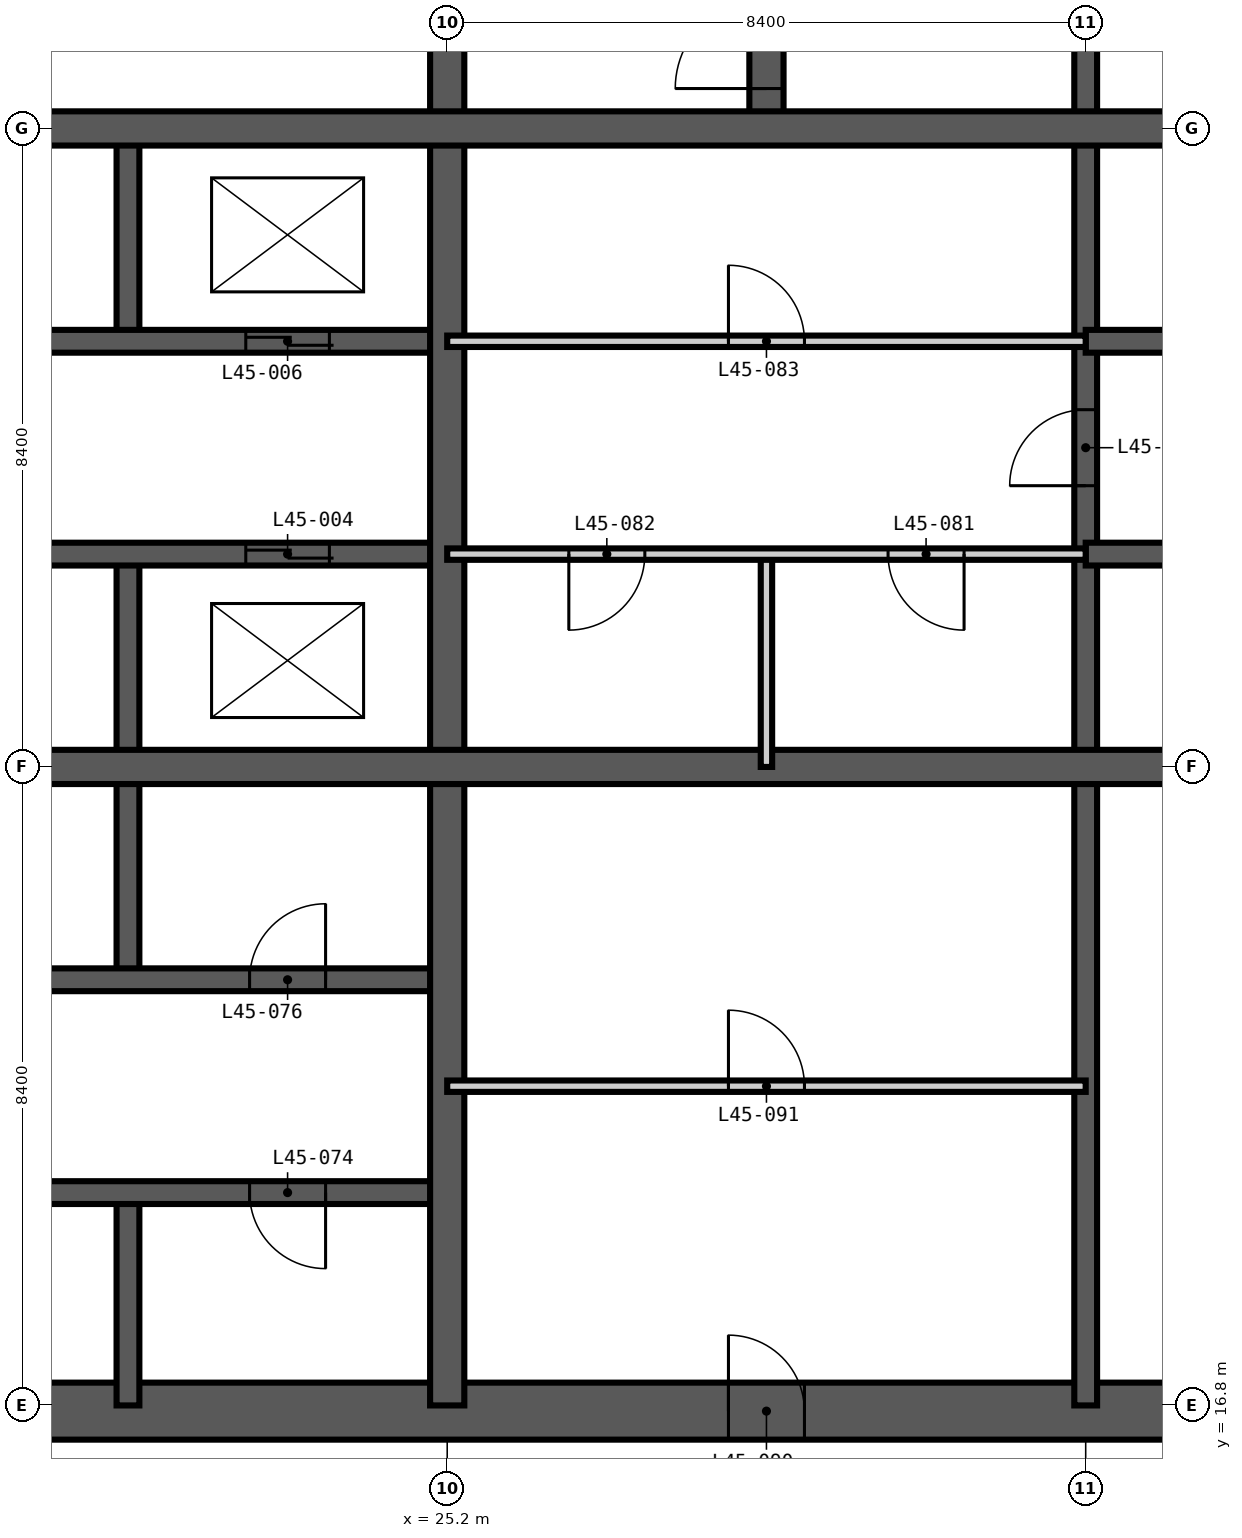
"""IFC4 building model, lengths in metres.
Left out: names, types, materials, properties, quantities, classifications, styles, units other than length and angle.
Written with IfcOpenShell. Run it as: python <this file> out.ifc"""

import sys

from ifc_helpers import new_model, si_unit, direction, frame, frame_2d, origin, place, context, subcontext, project, spatial, rectangle, extrude, element, fill, save


model = new_model("IFC4")
c1 = context("Model", 3, precision=1e-05, world=origin(), true_north=direction((0.0, 1.0)))
c2 = subcontext(c1, "Body", "Model", "MODEL_VIEW")
j1 = project(units=[si_unit("LENGTHUNIT", "METRE"), si_unit("PLANEANGLEUNIT", "RADIAN")], contexts=[c1])
p1 = place(None, origin())
s1 = spatial("IfcSite", under=j1, at=p1, CompositionType="ELEMENT")
p2 = place(p1, origin())
s2 = spatial("IfcBuilding", under=s1, at=p2, CompositionType="ELEMENT")
p3 = place(p2, frame((0.0, 0.0, 177.0)))
s3 = spatial("IfcBuildingStorey", under=s2, at=p3, CompositionType="ELEMENT", Elevation=177.0)
p4 = place(p3, frame((16.35, 16.725, -0.35), z_axis=(0.0, 0.0, 1.0), x_axis=(1.0, 0.0, 0.0)))
e1 = element("IfcWall", 1, at=p4, inside=s3, PredefinedType="SHEAR", context=c2, shape_type="SweptSolid", body=[
    extrude(rectangle(XDim=26.1, YDim=0.75, at=frame_2d((13.05, 0.0))), origin(), (0.0, 0.0, 1.0), 3.6),
])
p5 = place(p4, frame((12.55, 0.0, 0.35)))
e2 = element("IfcOpeningElement", 2, at=p5, cuts=e1, PredefinedType="OPENING", context=c2, shape_type="SweptSolid", body=[
    extrude(rectangle(XDim=1.0, YDim=2.1, at=frame_2d((0.5, 1.05))), frame((0.0, 0.385, 0.0), z_axis=(0.0, -1.0, 0.0), x_axis=(1.0, 0.0, 0.0)), (0.0, 0.0, 1.0), 0.77),
])
p6 = place(p4, frame((18.85, 0.0, 0.35)))
e3 = element("IfcOpeningElement", 3, at=p6, cuts=e1, PredefinedType="OPENING", context=c2, shape_type="SweptSolid", body=[
    extrude(rectangle(XDim=1.0, YDim=2.1, at=frame_2d((0.5, 1.05))), frame((0.0, 0.385, 0.0), z_axis=(0.0, -1.0, 0.0), x_axis=(1.0, 0.0, 0.0)), (0.0, 0.0, 1.0), 0.77),
])
p7 = place(p3, frame((21.0, 16.8, -0.35), z_axis=(0.0, 0.0, 1.0), x_axis=(0.0, 1.0, 0.0)))
e4 = element("IfcWall", 4, at=p7, inside=s3, PredefinedType="SHEAR", context=c2, shape_type="SweptSolid", body=[
    extrude(rectangle(XDim=2.8, YDim=0.3, at=frame_2d((1.4, 0.0))), origin(), (0.0, 0.0, 1.0), 3.6),
])
p8 = place(p3, frame((21.0, 22.4, -0.35), z_axis=(0.0, 0.0, 1.0), x_axis=(0.0, 1.0, 0.0)))
e5 = element("IfcWall", 5, at=p8, inside=s3, PredefinedType="SHEAR", context=c2, shape_type="SweptSolid", body=[
    extrude(rectangle(XDim=5.6, YDim=0.3, at=frame_2d((2.8, 0.0))), origin(), (0.0, 0.0, 1.0), 3.6),
])
p9 = place(p3, frame((21.0, 30.8, -0.35), z_axis=(0.0, 0.0, 1.0), x_axis=(0.0, 1.0, 0.0)))
e6 = element("IfcWall", 6, at=p9, inside=s3, PredefinedType="SHEAR", context=c2, shape_type="SweptSolid", body=[
    extrude(rectangle(XDim=2.8, YDim=0.3, at=frame_2d((1.4, 0.0))), origin(), (0.0, 0.0, 1.0), 3.6),
])
p10 = place(p3, frame((33.6, 16.8, -0.35), z_axis=(0.0, 0.0, 1.0), x_axis=(0.0, 1.0, 0.0)))
e7 = element("IfcWall", 7, at=p10, inside=s3, PredefinedType="SHEAR", context=c2, shape_type="SweptSolid", body=[
    extrude(rectangle(XDim=25.2, YDim=0.3, at=frame_2d((12.6, 0.0))), origin(), (0.0, 0.0, 1.0), 3.6),
])
p11 = place(p10, frame((22.5, 0.0, 0.35)))
e8 = element("IfcOpeningElement", 8, at=p11, cuts=e7, PredefinedType="OPENING", context=c2, shape_type="SweptSolid", body=[
    extrude(rectangle(XDim=1.2, YDim=2.2, at=frame_2d((0.6, 1.1))), frame((0.0, 0.16, 0.0), z_axis=(0.0, -1.0, 0.0), x_axis=(1.0, 0.0, 0.0)), (0.0, 0.0, 1.0), 0.32),
])
p12 = place(p10, frame((18.3, 0.0, 0.35)))
e9 = element("IfcOpeningElement", 9, at=p12, cuts=e7, PredefinedType="OPENING", context=c2, shape_type="SweptSolid", body=[
    extrude(rectangle(XDim=1.2, YDim=2.2, at=frame_2d((0.6, 1.1))), frame((0.0, 0.16, 0.0), z_axis=(0.0, -1.0, 0.0), x_axis=(1.0, 0.0, 0.0)), (0.0, 0.0, 1.0), 0.32),
])
p13 = place(p10, frame((12.1, 0.0, 0.35)))
e10 = element("IfcOpeningElement", 10, at=p13, cuts=e7, PredefinedType="OPENING", context=c2, shape_type="SweptSolid", body=[
    extrude(rectangle(XDim=1.0, YDim=2.1, at=frame_2d((0.5, 1.05))), frame((0.0, 0.16, 0.0), z_axis=(0.0, -1.0, 0.0), x_axis=(1.0, 0.0, 0.0)), (0.0, 0.0, 1.0), 0.32),
])
p14 = place(p3, frame((16.8, 19.6, -0.35), z_axis=(0.0, 0.0, 1.0), x_axis=(1.0, 0.0, 0.0)))
e11 = element("IfcWall", 11, at=p14, inside=s3, PredefinedType="SHEAR", context=c2, shape_type="SweptSolid", body=[
    extrude(rectangle(XDim=8.4, YDim=0.3, at=frame_2d((4.2, 0.0))), origin(), (0.0, 0.0, 1.0), 3.6),
])
p15 = place(p14, frame((1.6, 0.0, 0.35)))
e12 = element("IfcOpeningElement", 12, at=p15, cuts=e11, PredefinedType="OPENING", context=c2, shape_type="SweptSolid", body=[
    extrude(rectangle(XDim=1.0, YDim=2.1, at=frame_2d((0.5, 1.05))), frame((0.0, 0.16, 0.0), z_axis=(0.0, -1.0, 0.0), x_axis=(1.0, 0.0, 0.0)), (0.0, 0.0, 1.0), 0.32),
])
p16 = place(p14, frame((5.8, 0.0, 0.35)))
e13 = element("IfcOpeningElement", 13, at=p16, cuts=e11, PredefinedType="OPENING", context=c2, shape_type="SweptSolid", body=[
    extrude(rectangle(XDim=1.0, YDim=2.1, at=frame_2d((0.5, 1.05))), frame((0.0, 0.16, 0.0), z_axis=(0.0, -1.0, 0.0), x_axis=(1.0, 0.0, 0.0)), (0.0, 0.0, 1.0), 0.32),
])
p17 = place(p3, frame((16.8, 22.4, -0.35), z_axis=(0.0, 0.0, 1.0), x_axis=(1.0, 0.0, 0.0)))
e14 = element("IfcWall", 14, at=p17, inside=s3, PredefinedType="SHEAR", context=c2, shape_type="SweptSolid", body=[
    extrude(rectangle(XDim=8.4, YDim=0.3, at=frame_2d((4.2, 0.0))), origin(), (0.0, 0.0, 1.0), 3.6),
])
p18 = place(p17, frame((1.6, 0.0, 0.35)))
e15 = element("IfcOpeningElement", 15, at=p18, cuts=e14, PredefinedType="OPENING", context=c2, shape_type="SweptSolid", body=[
    extrude(rectangle(XDim=1.0, YDim=2.1, at=frame_2d((0.5, 1.05))), frame((0.0, 0.16, 0.0), z_axis=(0.0, -1.0, 0.0), x_axis=(1.0, 0.0, 0.0)), (0.0, 0.0, 1.0), 0.32),
])
p19 = place(p17, frame((5.8, 0.0, 0.35)))
e16 = element("IfcOpeningElement", 16, at=p19, cuts=e14, PredefinedType="OPENING", context=c2, shape_type="SweptSolid", body=[
    extrude(rectangle(XDim=1.0, YDim=2.1, at=frame_2d((0.5, 1.05))), frame((0.0, 0.16, 0.0), z_axis=(0.0, -1.0, 0.0), x_axis=(1.0, 0.0, 0.0)), (0.0, 0.0, 1.0), 0.32),
])
p20 = place(p3, frame((16.8, 28.0, -0.35), z_axis=(0.0, 0.0, 1.0), x_axis=(1.0, 0.0, 0.0)))
e17 = element("IfcWall", 17, at=p20, inside=s3, PredefinedType="SHEAR", context=c2, shape_type="SweptSolid", body=[
    extrude(rectangle(XDim=8.4, YDim=0.3, at=frame_2d((4.2, 0.0))), origin(), (0.0, 0.0, 1.0), 3.6),
])
p21 = place(p20, frame((1.55, 0.0, 0.35)))
e18 = element("IfcOpeningElement", 18, at=p21, cuts=e17, PredefinedType="OPENING", context=c2, shape_type="SweptSolid", body=[
    extrude(rectangle(XDim=1.1, YDim=2.2, at=frame_2d((0.55, 1.1))), frame((0.0, 0.16, 0.0), z_axis=(0.0, -1.0, 0.0), x_axis=(1.0, 0.0, 0.0)), (0.0, 0.0, 1.0), 0.32),
])
p22 = place(p20, frame((5.75, 0.0, 0.35)))
e19 = element("IfcOpeningElement", 19, at=p22, cuts=e17, PredefinedType="OPENING", context=c2, shape_type="SweptSolid", body=[
    extrude(rectangle(XDim=1.1, YDim=2.2, at=frame_2d((0.55, 1.1))), frame((0.0, 0.16, 0.0), z_axis=(0.0, -1.0, 0.0), x_axis=(1.0, 0.0, 0.0)), (0.0, 0.0, 1.0), 0.32),
])
p23 = place(p3, frame((33.6, 28.0, -0.35), z_axis=(0.0, 0.0, 1.0), x_axis=(1.0, 0.0, 0.0)))
e20 = element("IfcWall", 20, at=p23, inside=s3, PredefinedType="SHEAR", context=c2, shape_type="SweptSolid", body=[
    extrude(rectangle(XDim=8.4, YDim=0.3, at=frame_2d((4.2, 0.0))), origin(), (0.0, 0.0, 1.0), 3.6),
])
p24 = place(p23, frame((1.6, 0.0, 0.35)))
e21 = element("IfcOpeningElement", 21, at=p24, cuts=e20, PredefinedType="OPENING", context=c2, shape_type="SweptSolid", body=[
    extrude(rectangle(XDim=1.0, YDim=2.1, at=frame_2d((0.5, 1.05))), frame((0.0, 0.16, 0.0), z_axis=(0.0, -1.0, 0.0), x_axis=(1.0, 0.0, 0.0)), (0.0, 0.0, 1.0), 0.32),
])
p25 = place(p23, frame((4.6, 0.0, 0.35)))
e22 = element("IfcOpeningElement", 22, at=p25, cuts=e20, PredefinedType="OPENING", context=c2, shape_type="SweptSolid", body=[
    extrude(rectangle(XDim=1.0, YDim=2.1, at=frame_2d((0.5, 1.05))), frame((0.0, 0.16, 0.0), z_axis=(0.0, -1.0, 0.0), x_axis=(1.0, 0.0, 0.0)), (0.0, 0.0, 1.0), 0.32),
])
p26 = place(p3, frame((16.8, 30.8, -0.35), z_axis=(0.0, 0.0, 1.0), x_axis=(1.0, 0.0, 0.0)))
e23 = element("IfcWall", 23, at=p26, inside=s3, PredefinedType="SHEAR", context=c2, shape_type="SweptSolid", body=[
    extrude(rectangle(XDim=8.4, YDim=0.3, at=frame_2d((4.2, 0.0))), origin(), (0.0, 0.0, 1.0), 3.6),
])
p27 = place(p26, frame((1.55, 0.0, 0.35)))
e24 = element("IfcOpeningElement", 24, at=p27, cuts=e23, PredefinedType="OPENING", context=c2, shape_type="SweptSolid", body=[
    extrude(rectangle(XDim=1.1, YDim=2.2, at=frame_2d((0.55, 1.1))), frame((0.0, 0.16, 0.0), z_axis=(0.0, -1.0, 0.0), x_axis=(1.0, 0.0, 0.0)), (0.0, 0.0, 1.0), 0.32),
])
p28 = place(p26, frame((5.75, 0.0, 0.35)))
e25 = element("IfcOpeningElement", 25, at=p28, cuts=e23, PredefinedType="OPENING", context=c2, shape_type="SweptSolid", body=[
    extrude(rectangle(XDim=1.1, YDim=2.2, at=frame_2d((0.55, 1.1))), frame((0.0, 0.16, 0.0), z_axis=(0.0, -1.0, 0.0), x_axis=(1.0, 0.0, 0.0)), (0.0, 0.0, 1.0), 0.32),
])
p29 = place(p3, frame((33.6, 30.8, -0.35), z_axis=(0.0, 0.0, 1.0), x_axis=(1.0, 0.0, 0.0)))
e26 = element("IfcWall", 26, at=p29, inside=s3, PredefinedType="SHEAR", context=c2, shape_type="SweptSolid", body=[
    extrude(rectangle(XDim=8.4, YDim=0.3, at=frame_2d((4.2, 0.0))), origin(), (0.0, 0.0, 1.0), 3.6),
])
p30 = place(p3, frame((25.2, 16.8, -0.35), z_axis=(0.0, 0.0, 1.0), x_axis=(0.0, 1.0, 0.0)))
e27 = element("IfcWall", 27, at=p30, inside=s3, PredefinedType="SHEAR", context=c2, shape_type="SweptSolid", body=[
    extrude(rectangle(XDim=25.2, YDim=0.45, at=frame_2d((12.6, 0.0))), origin(), (0.0, 0.0, 1.0), 3.6),
])
p31 = place(p3, frame((29.4, 33.6, -0.35), z_axis=(0.0, 0.0, 1.0), x_axis=(0.0, 1.0, 0.0)))
e28 = element("IfcWall", 28, at=p31, inside=s3, PredefinedType="SHEAR", context=c2, shape_type="SweptSolid", body=[
    extrude(rectangle(XDim=8.4, YDim=0.45, at=frame_2d((4.2, 0.0))), origin(), (0.0, 0.0, 1.0), 3.6),
])
p32 = place(p31, frame((0.525, 0.0, 0.35)))
e29 = element("IfcOpeningElement", 29, at=p32, cuts=e28, PredefinedType="OPENING", context=c2, shape_type="SweptSolid", body=[
    extrude(rectangle(XDim=1.2, YDim=2.2, at=frame_2d((0.6, 1.1))), frame((0.0, 0.235, 0.0), z_axis=(0.0, -1.0, 0.0), x_axis=(1.0, 0.0, 0.0)), (0.0, 0.0, 1.0), 0.47),
])
for number, where, z_axis, x_axis in (
    (30, (16.8, 25.2, -0.35), (0.0, 0.0, 1.0), (1.0, 0.0, 0.0)),
    (31, (16.8, 33.6, -0.35), (0.0, 0.0, 1.0), (1.0, 0.0, 0.0)),
):
    element("IfcWall", number, at=place(p3, frame(where, z_axis=z_axis, x_axis=x_axis)), inside=s3, PredefinedType="SHEAR", context=c2, shape_type="SweptSolid", body=[
        extrude(rectangle(XDim=25.2, YDim=0.45, at=frame_2d((12.6, 0.0))), origin(), (0.0, 0.0, 1.0), 3.6),
    ])
p33 = place(p3, frame((29.4, 25.2, 0.0), z_axis=(0.0, 0.0, 1.0), x_axis=(0.0, 1.0, 0.0)))
e32 = element("IfcWall", 32, at=p33, inside=s3, PredefinedType="PARTITIONING", context=c2, shape_type="SweptSolid", body=[
    extrude(rectangle(XDim=2.8, YDim=0.15, at=frame_2d((1.4, 0.0))), origin(), (0.0, 0.0, 1.0), 3.25),
])
p34 = place(p3, frame((25.2, 21.0, 0.0), z_axis=(0.0, 0.0, 1.0), x_axis=(1.0, 0.0, 0.0)))
e33 = element("IfcWall", 33, at=p34, inside=s3, PredefinedType="PARTITIONING", context=c2, shape_type="SweptSolid", body=[
    extrude(rectangle(XDim=8.4, YDim=0.15, at=frame_2d((4.2, 0.0))), origin(), (0.0, 0.0, 1.0), 3.25),
])
p35 = place(p34, frame((3.7, 0.0, 0.0)))
e34 = element("IfcOpeningElement", 34, at=p35, cuts=e33, PredefinedType="OPENING", context=c2, shape_type="SweptSolid", body=[
    extrude(rectangle(XDim=1.0, YDim=2.1, at=frame_2d((0.5, 1.05))), frame((0.0, 0.085, 0.0), z_axis=(0.0, -1.0, 0.0), x_axis=(1.0, 0.0, 0.0)), (0.0, 0.0, 1.0), 0.17),
])
p36 = place(p3, frame((25.2, 28.0, 0.0), z_axis=(0.0, 0.0, 1.0), x_axis=(1.0, 0.0, 0.0)))
e35 = element("IfcWall", 35, at=p36, inside=s3, PredefinedType="PARTITIONING", context=c2, shape_type="SweptSolid", body=[
    extrude(rectangle(XDim=8.4, YDim=0.15, at=frame_2d((4.2, 0.0))), origin(), (0.0, 0.0, 1.0), 3.25),
])
p37 = place(p36, frame((5.8, 0.0, 0.0)))
e36 = element("IfcOpeningElement", 36, at=p37, cuts=e35, PredefinedType="OPENING", context=c2, shape_type="SweptSolid", body=[
    extrude(rectangle(XDim=1.0, YDim=2.1, at=frame_2d((0.5, 1.05))), frame((0.0, 0.085, 0.0), z_axis=(0.0, -1.0, 0.0), x_axis=(1.0, 0.0, 0.0)), (0.0, 0.0, 1.0), 0.17),
])
p38 = place(p36, frame((1.6, 0.0, 0.0)))
e37 = element("IfcOpeningElement", 37, at=p38, cuts=e35, PredefinedType="OPENING", context=c2, shape_type="SweptSolid", body=[
    extrude(rectangle(XDim=1.0, YDim=2.1, at=frame_2d((0.5, 1.05))), frame((0.0, 0.085, 0.0), z_axis=(0.0, -1.0, 0.0), x_axis=(1.0, 0.0, 0.0)), (0.0, 0.0, 1.0), 0.17),
])
p39 = place(p3, frame((25.2, 30.8, 0.0), z_axis=(0.0, 0.0, 1.0), x_axis=(1.0, 0.0, 0.0)))
e38 = element("IfcWall", 38, at=p39, inside=s3, PredefinedType="PARTITIONING", context=c2, shape_type="SweptSolid", body=[
    extrude(rectangle(XDim=8.4, YDim=0.15, at=frame_2d((4.2, 0.0))), origin(), (0.0, 0.0, 1.0), 3.25),
])
p40 = place(p39, frame((3.7, 0.0, 0.0)))
e39 = element("IfcOpeningElement", 39, at=p40, cuts=e38, PredefinedType="OPENING", context=c2, shape_type="SweptSolid", body=[
    extrude(rectangle(XDim=1.0, YDim=2.1, at=frame_2d((0.5, 1.05))), frame((0.0, 0.085, 0.0), z_axis=(0.0, -1.0, 0.0), x_axis=(1.0, 0.0, 0.0)), (0.0, 0.0, 1.0), 0.17),
])
p41 = place(p32, origin())
e40 = element("IfcDoor", 40, at=p41, inside=s3, OperationType="SINGLE_SWING_LEFT", PredefinedType="DOOR", context=c2, shape_type="SweptSolid", body=[
    extrude(rectangle(XDim=1.2, YDim=2.2, at=frame_2d((0.6, 1.1))), frame((0.0, 0.025, 0.0), z_axis=(0.0, -1.0, 0.0), x_axis=(1.0, 0.0, 0.0)), (0.0, 0.0, 1.0), 0.05),
])
fill(e29, e40)
p42 = place(p22, origin())
e41 = element("IfcDoor", 41, at=p42, inside=s3, OperationType="DOUBLE_DOOR_SLIDING", PredefinedType="DOOR", context=c2, shape_type="SweptSolid", body=[
    extrude(rectangle(XDim=1.1, YDim=2.2, at=frame_2d((0.55, 1.1))), frame((0.0, 0.025, 0.0), z_axis=(0.0, -1.0, 0.0), x_axis=(1.0, 0.0, 0.0)), (0.0, 0.0, 1.0), 0.05),
])
fill(e19, e41)
p43 = place(p28, origin())
e42 = element("IfcDoor", 42, at=p43, inside=s3, OperationType="DOUBLE_DOOR_SLIDING", PredefinedType="DOOR", context=c2, shape_type="SweptSolid", body=[
    extrude(rectangle(XDim=1.1, YDim=2.2, at=frame_2d((0.55, 1.1))), frame((0.0, 0.025, 0.0), z_axis=(0.0, -1.0, 0.0), x_axis=(1.0, 0.0, 0.0)), (0.0, 0.0, 1.0), 0.05),
])
fill(e25, e42)
p44 = place(p16, frame((1.0, 0.0, 0.0), z_axis=(0.0, 0.0, 1.0), x_axis=(-1.0, 0.0, 0.0)))
e43 = element("IfcDoor", 43, at=p44, inside=s3, OperationType="SINGLE_SWING_LEFT", PredefinedType="DOOR", context=c2, shape_type="SweptSolid", body=[
    extrude(rectangle(XDim=1.0, YDim=2.1, at=frame_2d((0.5, 1.05))), frame((0.0, 0.025, 0.0), z_axis=(0.0, -1.0, 0.0), x_axis=(1.0, 0.0, 0.0)), (0.0, 0.0, 1.0), 0.05),
])
fill(e13, e43)
p45 = place(p19, origin())
e44 = element("IfcDoor", 44, at=p45, inside=s3, OperationType="SINGLE_SWING_RIGHT", PredefinedType="DOOR", context=c2, shape_type="SweptSolid", body=[
    extrude(rectangle(XDim=1.0, YDim=2.1, at=frame_2d((0.5, 1.05))), frame((0.0, 0.025, 0.0), z_axis=(0.0, -1.0, 0.0), x_axis=(1.0, 0.0, 0.0)), (0.0, 0.0, 1.0), 0.05),
])
fill(e16, e44)
p46 = place(p13, origin())
e45 = element("IfcDoor", 45, at=p46, inside=s3, OperationType="SINGLE_SWING_LEFT", PredefinedType="DOOR", context=c2, shape_type="SweptSolid", body=[
    extrude(rectangle(XDim=1.0, YDim=2.1, at=frame_2d((0.5, 1.05))), frame((0.0, 0.025, 0.0), z_axis=(0.0, -1.0, 0.0), x_axis=(1.0, 0.0, 0.0)), (0.0, 0.0, 1.0), 0.05),
])
fill(e10, e45)
p47 = place(p37, frame((1.0, 0.0, 0.0), z_axis=(0.0, 0.0, 1.0), x_axis=(-1.0, 0.0, 0.0)))
e46 = element("IfcDoor", 46, at=p47, inside=s3, OperationType="SINGLE_SWING_LEFT", PredefinedType="DOOR", context=c2, shape_type="SweptSolid", body=[
    extrude(rectangle(XDim=1.0, YDim=2.1, at=frame_2d((0.5, 1.05))), frame((0.0, 0.025, 0.0), z_axis=(0.0, -1.0, 0.0), x_axis=(1.0, 0.0, 0.0)), (0.0, 0.0, 1.0), 0.05),
])
fill(e36, e46)
p48 = place(p38, frame((1.0, 0.0, 0.0), z_axis=(0.0, 0.0, 1.0), x_axis=(-1.0, 0.0, 0.0)))
e47 = element("IfcDoor", 47, at=p48, inside=s3, OperationType="SINGLE_SWING_RIGHT", PredefinedType="DOOR", context=c2, shape_type="SweptSolid", body=[
    extrude(rectangle(XDim=1.0, YDim=2.1, at=frame_2d((0.5, 1.05))), frame((0.0, 0.025, 0.0), z_axis=(0.0, -1.0, 0.0), x_axis=(1.0, 0.0, 0.0)), (0.0, 0.0, 1.0), 0.05),
])
fill(e37, e47)
p49 = place(p40, origin())
e48 = element("IfcDoor", 48, at=p49, inside=s3, OperationType="SINGLE_SWING_LEFT", PredefinedType="DOOR", context=c2, shape_type="SweptSolid", body=[
    extrude(rectangle(XDim=1.0, YDim=2.1, at=frame_2d((0.5, 1.05))), frame((0.0, 0.025, 0.0), z_axis=(0.0, -1.0, 0.0), x_axis=(1.0, 0.0, 0.0)), (0.0, 0.0, 1.0), 0.05),
])
fill(e39, e48)
p50 = place(p5, origin())
e49 = element("IfcDoor", 49, at=p50, inside=s3, OperationType="SINGLE_SWING_LEFT", PredefinedType="DOOR", context=c2, shape_type="SweptSolid", body=[
    extrude(rectangle(XDim=1.0, YDim=2.1, at=frame_2d((0.5, 1.05))), frame((0.0, 0.025, 0.0), z_axis=(0.0, -1.0, 0.0), x_axis=(1.0, 0.0, 0.0)), (0.0, 0.0, 1.0), 0.05),
])
fill(e2, e49)
p51 = place(p35, origin())
e50 = element("IfcDoor", 50, at=p51, inside=s3, OperationType="SINGLE_SWING_LEFT", PredefinedType="DOOR", context=c2, shape_type="SweptSolid", body=[
    extrude(rectangle(XDim=1.0, YDim=2.1, at=frame_2d((0.5, 1.05))), frame((0.0, 0.025, 0.0), z_axis=(0.0, -1.0, 0.0), x_axis=(1.0, 0.0, 0.0)), (0.0, 0.0, 1.0), 0.05),
])
fill(e34, e50)
save(model, sys.argv[1])
